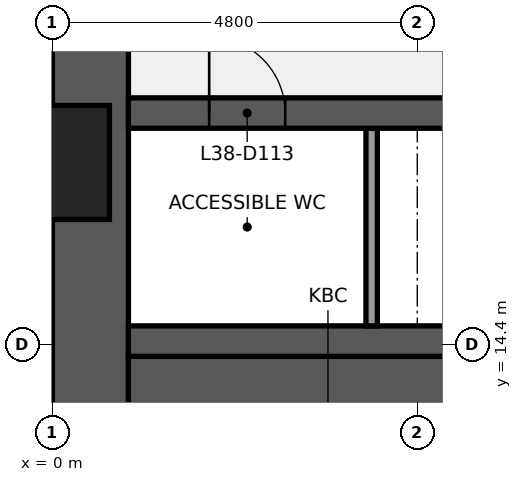
"""IFC4 building model, lengths in metres.
Left out: names, types, materials, properties, quantities, classifications, styles, units other than length and angle.
Written with IfcOpenShell. Run it as: python <this file> out.ifc"""

import sys

from ifc_helpers import new_model, si_unit, direction, frame, frame_2d, origin, place, context, subcontext, project, spatial, rectangle, extrude, element, fill, save


model = new_model("IFC4")
c1 = context("Model", 3, precision=1e-05, world=origin(), true_north=direction((0.0, 1.0)))
c2 = subcontext(c1, "Body", "Model", "MODEL_VIEW")
j1 = project(units=[si_unit("LENGTHUNIT", "METRE"), si_unit("PLANEANGLEUNIT", "RADIAN")], contexts=[c1])
p1 = place(None, origin())
s1 = spatial("IfcSite", under=j1, at=p1, CompositionType="ELEMENT")
p2 = place(p1, origin())
s2 = spatial("IfcBuilding", under=s1, at=p2, CompositionType="ELEMENT")
p3 = place(p2, frame((0.0, 0.0, 172.1)))
s3 = spatial("IfcBuildingStorey", under=s2, at=p3, CompositionType="ELEMENT", Elevation=172.1)
p4 = place(p3, frame((0.5, 9.6, 0.0), z_axis=(0.0, 0.0, 1.0), x_axis=(0.0, 1.0, 0.0)))
e1 = element("IfcWall", 1, at=p4, inside=s3, PredefinedType="SHEAR", context=c2, shape_type="SweptSolid", body=[
    extrude(rectangle(XDim=28.8, YDim=1.0, at=frame_2d((14.4, 0.0))), origin(), (0.0, 0.0, 1.0), 3.7),
])
p5 = place(p4, frame((8.85, 0.0, 0.9)))
e2 = element("IfcOpeningElement", 2, at=p5, cuts=e1, PredefinedType="OPENING", context=c2, shape_type="SweptSolid", body=[
    extrude(rectangle(XDim=1.5, YDim=1.5, at=frame_2d((0.75, 0.75))), frame((0.0, 0.51, 0.0), z_axis=(0.0, -1.0, 0.0), x_axis=(1.0, 0.0, 0.0)), (0.0, 0.0, 1.0), 1.02),
])
p6 = place(p4, frame((18.45, 0.0, 0.9)))
e3 = element("IfcOpeningElement", 3, at=p6, cuts=e1, PredefinedType="OPENING", context=c2, shape_type="SweptSolid", body=[
    extrude(rectangle(XDim=1.5, YDim=1.5, at=frame_2d((0.75, 0.75))), frame((0.0, 0.51, 0.0), z_axis=(0.0, -1.0, 0.0), x_axis=(1.0, 0.0, 0.0)), (0.0, 0.0, 1.0), 1.02),
])
p7 = place(p3, frame((1.0, 12.425, 0.0), z_axis=(0.0, 0.0, 1.0), x_axis=(1.0, 0.0, 0.0)))
e4 = element("IfcWall", 4, at=p7, inside=s3, PredefinedType="SHEAR", context=c2, shape_type="SweptSolid", body=[
    extrude(rectangle(XDim=5.25, YDim=3.65, at=frame_2d((2.625, 0.0))), origin(), (0.0, 0.0, 1.0), 3.7),
])
p8 = place(p3, frame((1.0, 14.45, 0.0), z_axis=(0.0, 0.0, 1.0), x_axis=(1.0, 0.0, 0.0)))
e5 = element("IfcWall", 5, at=p8, inside=s3, PredefinedType="SHEAR", context=c2, shape_type="SweptSolid", body=[
    extrude(rectangle(XDim=17.2, YDim=0.4, at=frame_2d((8.6, 0.0))), origin(), (0.0, 0.0, 1.0), 3.7),
])
p9 = place(p3, frame((4.2, 14.65, 0.0), z_axis=(0.0, 0.0, 1.0), x_axis=(0.0, 1.0, 0.0)))
e6 = element("IfcWall", 6, at=p9, inside=s3, PredefinedType="PARTITIONING", context=c2, shape_type="SweptSolid", body=[
    extrude(rectangle(XDim=2.6, YDim=0.15, at=frame_2d((1.3, 0.0))), origin(), (0.0, 0.0, 1.0), 3.7),
])
p10 = place(p3, frame((1.0, 17.45, 0.0), z_axis=(0.0, 0.0, 1.0), x_axis=(1.0, 0.0, 0.0)))
e7 = element("IfcWall", 7, at=p10, inside=s3, PredefinedType="SHEAR", context=c2, shape_type="SweptSolid", body=[
    extrude(rectangle(XDim=17.2, YDim=0.4, at=frame_2d((8.6, 0.0))), origin(), (0.0, 0.0, 1.0), 3.7),
])
p11 = place(p10, frame((1.062, 0.0, 0.0)))
e8 = element("IfcOpeningElement", 8, at=p11, cuts=e7, PredefinedType="OPENING", context=c2, shape_type="SweptSolid", body=[
    extrude(rectangle(XDim=1.0, YDim=2.1, at=frame_2d((0.5, 1.05))), frame((0.0, 0.21, 0.0), z_axis=(0.0, -1.0, 0.0), x_axis=(1.0, 0.0, 0.0)), (0.0, 0.0, 1.0), 0.42),
])
p12 = place(p10, frame((6.9, 0.0, 0.0)))
e9 = element("IfcOpeningElement", 9, at=p12, cuts=e7, PredefinedType="OPENING", context=c2, shape_type="SweptSolid", body=[
    extrude(rectangle(XDim=1.0, YDim=2.1, at=frame_2d((0.5, 1.05))), frame((0.0, 0.21, 0.0), z_axis=(0.0, -1.0, 0.0), x_axis=(1.0, 0.0, 0.0)), (0.0, 0.0, 1.0), 0.42),
])
p13 = place(p10, frame((13.938, 0.0, 0.0)))
e10 = element("IfcOpeningElement", 10, at=p13, cuts=e7, PredefinedType="OPENING", context=c2, shape_type="SweptSolid", body=[
    extrude(rectangle(XDim=1.0, YDim=2.1, at=frame_2d((0.5, 1.05))), frame((0.0, 0.21, 0.0), z_axis=(0.0, -1.0, 0.0), x_axis=(1.0, 0.0, 0.0)), (0.0, 0.0, 1.0), 0.42),
])
p14 = place(p11, origin())
e11 = element("IfcDoor", 11, at=p14, inside=s3, OperationType="SINGLE_SWING_LEFT", PredefinedType="DOOR", context=c2, shape_type="SweptSolid", body=[
    extrude(rectangle(XDim=1.0, YDim=2.1, at=frame_2d((0.5, 1.05))), frame((0.0, 0.025, 0.0), z_axis=(0.0, -1.0, 0.0), x_axis=(1.0, 0.0, 0.0)), (0.0, 0.0, 1.0), 0.05),
])
fill(e8, e11)
save(model, sys.argv[1])
